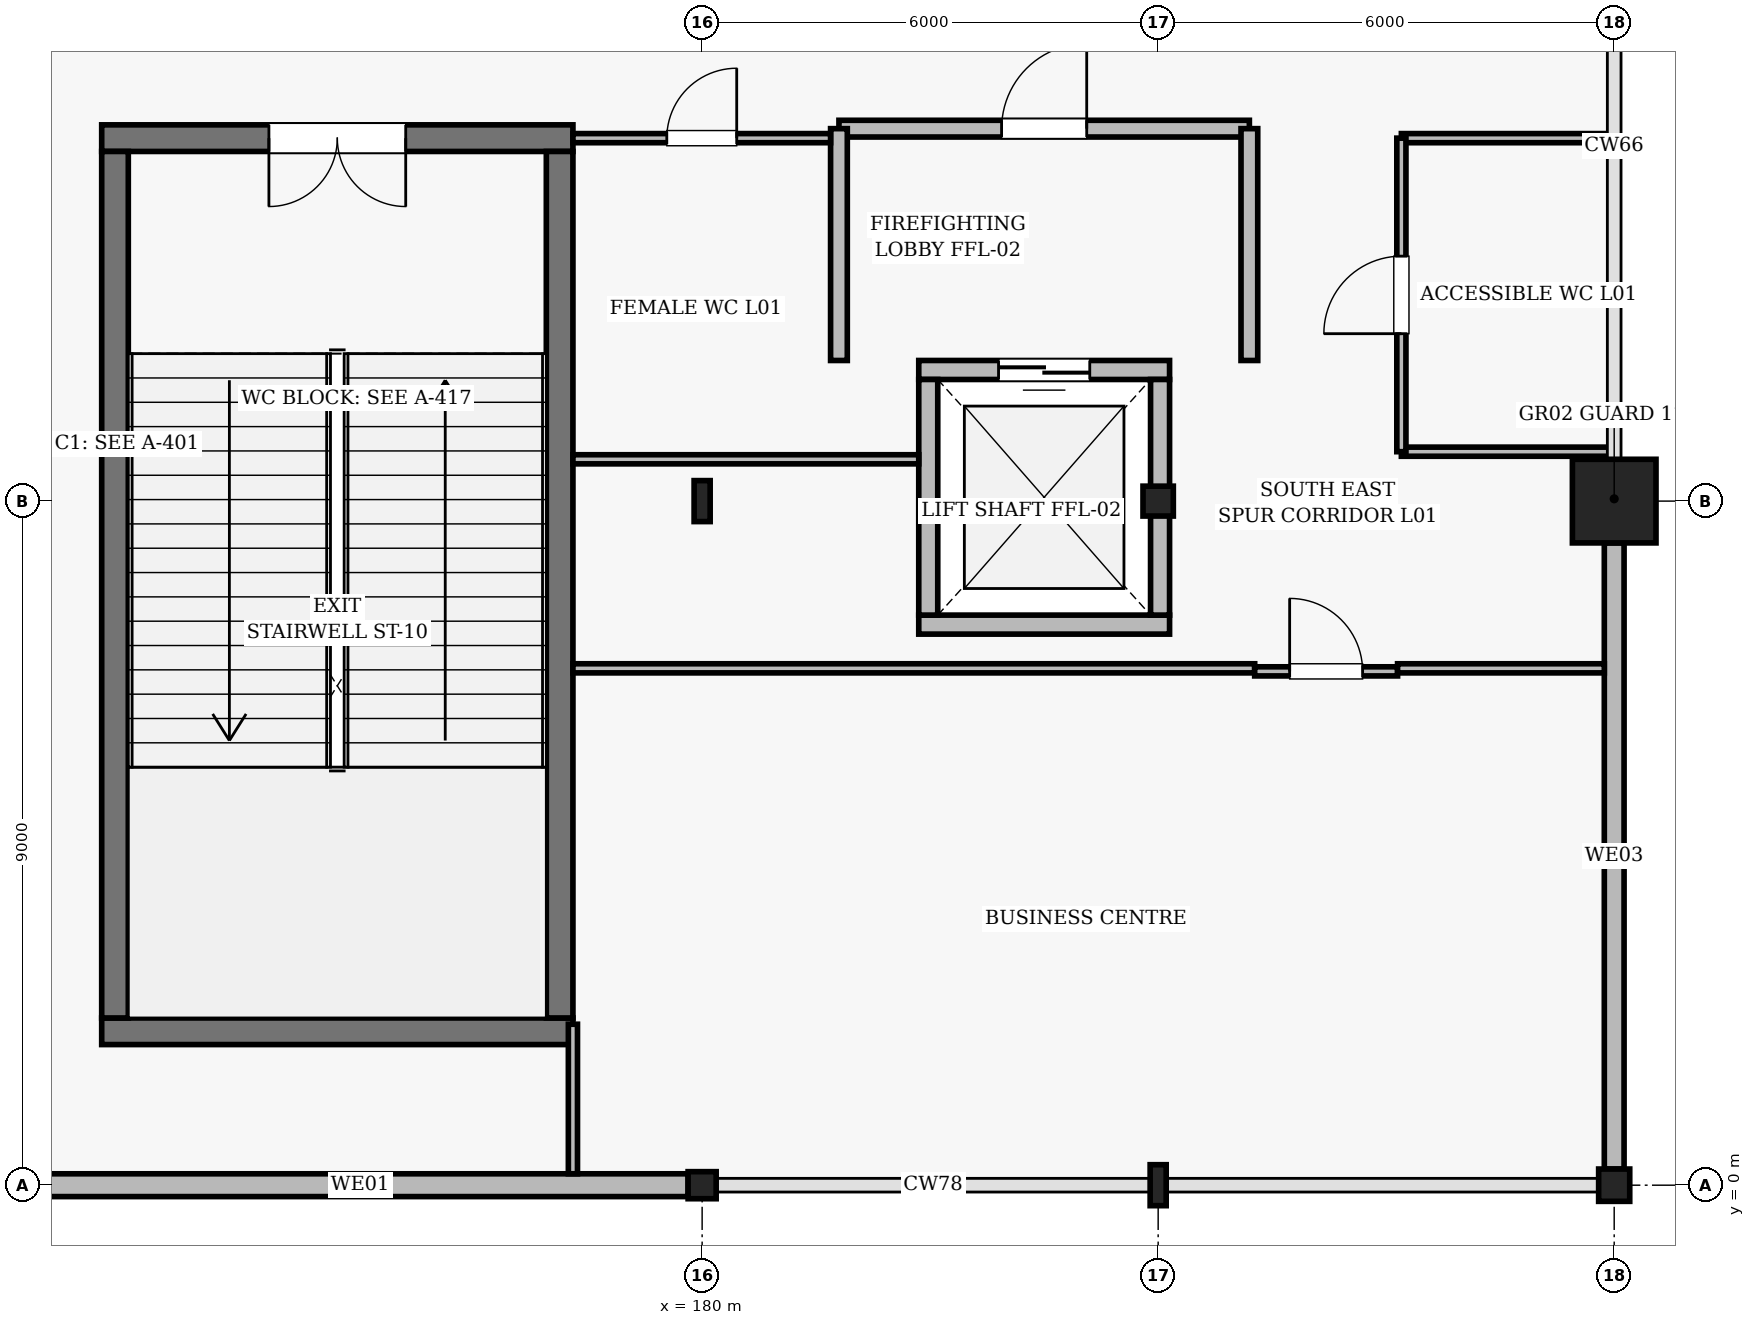
"""IFC4 building model, lengths in metres.
Left out: names, types, materials, properties, quantities, classifications, styles, units other than length and angle.
Written with IfcOpenShell. Run it as: python <this file> out.ifc"""

import sys

from ifc_helpers import new_model, si_unit, direction, frame, frame_2d, origin, origin_2d, place, context, subcontext, project, spatial, rectangle, i_section, extrude, element, fill, save


model = new_model("IFC4")
c1 = context("Model", 3, precision=1e-05, world=origin(), true_north=direction((0.0, 1.0)))
c2 = subcontext(c1, "Body", "Model", "MODEL_VIEW")
j1 = project(units=[si_unit("LENGTHUNIT", "METRE"), si_unit("PLANEANGLEUNIT", "RADIAN")], contexts=[c1])
p1 = place(None, origin())
s1 = spatial("IfcSite", under=j1, at=p1, CompositionType="ELEMENT")
p2 = place(p1, origin())
s2 = spatial("IfcBuilding", under=s1, at=p2, CompositionType="ELEMENT")
p3 = place(p2, frame((0.0, 0.0, 5.4)))
s3 = spatial("IfcBuildingStorey", under=s2, at=p3, CompositionType="ELEMENT", Elevation=5.4)
p4 = place(p3, frame((180.0, 0.0, 0.0), z_axis=(0.0, 0.0, 1.0), x_axis=(1.0, 0.0, 0.0)))
e1 = element("IfcColumn", 1, at=p4, inside=s3, PredefinedType="COLUMN", context=c2, shape_type="SweptSolid", body=[
    extrude(i_section(OverallWidth=0.369, OverallDepth=0.356, WebThickness=0.011, FlangeThickness=0.018, FilletRadius=0.015, at=origin_2d()), origin(), (0.0, 0.0, 1.0), 5.4),
])
for number, where, z_axis, x_axis in (
    (2, (180.0, 9.0, 0.0), (0.0, 0.0, 1.0), (1.0, 0.0, 0.0)),
    (3, (186.0, 0.0, 0.0), (0.0, 0.0, 1.0), (1.0, 0.0, 0.0)),
):
    element("IfcColumn", number, at=place(p3, frame(where, z_axis=z_axis, x_axis=x_axis)), inside=s3, PredefinedType="COLUMN", context=c2, shape_type="SweptSolid", body=[
        extrude(i_section(OverallWidth=0.211, OverallDepth=0.539, WebThickness=0.012, FlangeThickness=0.019, FilletRadius=0.014, at=origin_2d()), origin(), (0.0, 0.0, 1.0), 5.4),
    ])
p5 = place(p3, frame((186.0, 9.0, 0.0), z_axis=(0.0, 0.0, 1.0), x_axis=(1.0, 0.0, 0.0)))
e4 = element("IfcColumn", 4, at=p5, inside=s3, PredefinedType="COLUMN", context=c2, shape_type="SweptSolid", body=[
    extrude(i_section(OverallWidth=0.399, OverallDepth=0.393, WebThickness=0.023, FlangeThickness=0.037, FilletRadius=0.018, at=origin_2d()), origin(), (0.0, 0.0, 1.0), 5.4),
])
p6 = place(p3, frame((192.0, 0.0, 0.0), z_axis=(0.0, 0.0, 1.0), x_axis=(1.0, 0.0, 0.0)))
e5 = element("IfcColumn", 5, at=p6, inside=s3, PredefinedType="COLUMN", context=c2, shape_type="SweptSolid", body=[
    extrude(i_section(OverallWidth=0.409, OverallDepth=0.425, WebThickness=0.031, FlangeThickness=0.049, FilletRadius=0.02, at=origin_2d()), origin(), (0.0, 0.0, 1.0), 5.4),
])
p7 = place(p3, frame((192.0, 9.0, 0.0), z_axis=(0.0, 0.0, 1.0), x_axis=(1.0, 0.0, 0.0)))
e6 = element("IfcColumn", 6, at=p7, inside=s3, PredefinedType="COLUMN", context=c2, shape_type="SweptSolid", body=[
    extrude(rectangle(XDim=1.1, YDim=1.1, at=origin_2d()), origin(), (0.0, 0.0, 1.0), 5.4),
])
p8 = place(p3, frame((192.0, 8.45, 0.0), z_axis=(0.0, 0.0, 1.0), x_axis=(0.0, -1.0, 0.0)))
e7 = element("IfcWall", 7, at=p8, inside=s3, PredefinedType="SOLIDWALL", context=c2, shape_type="SweptSolid", body=[
    extrude(rectangle(XDim=8.238, YDim=0.26, at=frame_2d((4.119, 0.0))), origin(), (0.0, 0.0, 1.0), 4.865),
])
p9 = place(p3, frame((179.815, 0.0, 0.0), z_axis=(0.0, 0.0, 1.0), x_axis=(-1.0, 0.0, 0.0)))
e8 = element("IfcWall", 8, at=p9, inside=s3, PredefinedType="SOLIDWALL", context=c2, shape_type="SweptSolid", body=[
    extrude(rectangle(XDim=8.628, YDim=0.3, at=frame_2d((4.314, 0.0))), origin(), (0.0, 0.0, 1.0), 4.865),
])
p10 = place(p3, frame((172.1, 2.025, 0.0), z_axis=(0.0, 0.0, 1.0), x_axis=(1.0, 0.0, 0.0)))
e9 = element("IfcWall", 9, at=p10, inside=s3, PredefinedType="SHEAR", context=c2, shape_type="SweptSolid", body=[
    extrude(rectangle(XDim=6.2, YDim=0.35, at=frame_2d((3.1, 0.0))), origin(), (0.0, 0.0, 1.0), 5.18),
])
p11 = place(p3, frame((178.3, 13.775, 0.0), z_axis=(0.0, 0.0, 1.0), x_axis=(-1.0, 0.0, 0.0)))
e10 = element("IfcWall", 10, at=p11, inside=s3, PredefinedType="SHEAR", context=c2, shape_type="SweptSolid", body=[
    extrude(rectangle(XDim=6.2, YDim=0.35, at=frame_2d((3.1, 0.0))), origin(), (0.0, 0.0, 1.0), 5.18),
])
p12 = place(p11, frame((2.2, 0.0, 0.0)))
e11 = element("IfcOpeningElement", 11, at=p12, cuts=e10, PredefinedType="OPENING", context=c2, shape_type="SweptSolid", body=[
    extrude(rectangle(XDim=1.8, YDim=2.2, at=frame_2d((0.9, 1.1))), frame((0.0, 0.185, 0.0), z_axis=(0.0, -1.0, 0.0), x_axis=(1.0, 0.0, 0.0)), (0.0, 0.0, 1.0), 0.37),
])
for number, where, z_axis, x_axis in (
    (12, (172.275, 13.6, 0.0), (0.0, 0.0, 1.0), (0.0, -1.0, 0.0)),
    (13, (178.125, 2.2, 0.0), (0.0, 0.0, 1.0), (0.0, 1.0, 0.0)),
):
    element("IfcWall", number, at=place(p3, frame(where, z_axis=z_axis, x_axis=x_axis)), inside=s3, PredefinedType="SHEAR", context=c2, shape_type="SweptSolid", body=[
        extrude(rectangle(XDim=11.4, YDim=0.35, at=frame_2d((5.7, 0.0))), origin(), (0.0, 0.0, 1.0), 5.18),
    ])
p13 = place(p3, frame((182.85, 7.375, 0.0), z_axis=(0.0, 0.0, 1.0), x_axis=(1.0, 0.0, 0.0)))
e14 = element("IfcWall", 14, at=p13, inside=s3, PredefinedType="SOLIDWALL", context=c2, shape_type="SweptSolid", body=[
    extrude(rectangle(XDim=3.3, YDim=0.25, at=frame_2d((1.65, 0.0))), origin(), (0.0, 0.0, 1.0), 5.16),
])
p14 = place(p3, frame((186.15, 10.725, 0.0), z_axis=(0.0, 0.0, 1.0), x_axis=(-1.0, 0.0, 0.0)))
e15 = element("IfcWall", 15, at=p14, inside=s3, PredefinedType="SOLIDWALL", context=c2, shape_type="SweptSolid", body=[
    extrude(rectangle(XDim=3.3, YDim=0.25, at=frame_2d((1.65, 0.0))), origin(), (0.0, 0.0, 1.0), 5.16),
])
p15 = place(p14, frame((1.05, 0.0, 0.0)))
e16 = element("IfcOpeningElement", 16, at=p15, cuts=e15, PredefinedType="OPENING", context=c2, shape_type="SweptSolid", body=[
    extrude(rectangle(XDim=1.2, YDim=2.25, at=frame_2d((0.6, 1.125))), frame((0.0, 0.135, 0.0), z_axis=(0.0, -1.0, 0.0), x_axis=(1.0, 0.0, 0.0)), (0.0, 0.0, 1.0), 0.27),
])
for number, where, z_axis, x_axis in (
    (17, (182.975, 10.6, 0.0), (0.0, 0.0, 1.0), (0.0, -1.0, 0.0)),
    (18, (186.025, 7.5, 0.0), (0.0, 0.0, 1.0), (0.0, 1.0, 0.0)),
):
    element("IfcWall", number, at=place(p3, frame(where, z_axis=z_axis, x_axis=x_axis)), inside=s3, PredefinedType="SOLIDWALL", context=c2, shape_type="SweptSolid", body=[
        extrude(rectangle(XDim=3.1, YDim=0.25, at=frame_2d((1.55, 0.0))), origin(), (0.0, 0.0, 1.0), 5.16),
    ])
p16 = place(p3, frame((181.8, 13.9, 0.0), z_axis=(0.0, 0.0, 1.0), x_axis=(1.0, 0.0, 0.0)))
e19 = element("IfcWall", 19, at=p16, inside=s3, PredefinedType="SOLIDWALL", context=c2, shape_type="SweptSolid", body=[
    extrude(rectangle(XDim=5.4, YDim=0.22, at=frame_2d((2.7, 0.0))), origin(), (0.0, 0.0, 1.0), 5.16),
])
p17 = place(p16, frame((2.14, 0.0, 0.0)))
e20 = element("IfcOpeningElement", 20, at=p17, cuts=e19, PredefinedType="OPENING", context=c2, shape_type="SweptSolid", body=[
    extrude(rectangle(XDim=1.12, YDim=2.2, at=frame_2d((0.56, 1.1))), frame((0.0, 0.12, 0.0), z_axis=(0.0, -1.0, 0.0), x_axis=(1.0, 0.0, 0.0)), (0.0, 0.0, 1.0), 0.24),
])
for number, where, z_axis, x_axis in (
    (21, (181.8, 10.85, 0.0), (0.0, 0.0, 1.0), (0.0, 1.0, 0.0)),
    (22, (187.2, 10.85, 0.0), (0.0, 0.0, 1.0), (0.0, 1.0, 0.0)),
):
    element("IfcWall", number, at=place(p3, frame(where, z_axis=z_axis, x_axis=x_axis)), inside=s3, PredefinedType="SOLIDWALL", context=c2, shape_type="SweptSolid", body=[
        extrude(rectangle(XDim=3.05, YDim=0.22, at=frame_2d((1.525, 0.0))), origin(), (0.0, 0.0, 1.0), 5.16),
    ])
p18 = place(p3, frame((178.3, 13.775, 0.0), z_axis=(0.0, 0.0, 1.0), x_axis=(1.0, 0.0, 0.0)))
e23 = element("IfcWall", 23, at=p18, inside=s3, PredefinedType="PARTITIONING", context=c2, shape_type="SweptSolid", body=[
    extrude(rectangle(XDim=3.39, YDim=0.12, at=frame_2d((1.695, 0.0))), origin(), (0.0, 0.0, 1.0), 4.392),
])
p19 = place(p18, frame((1.235, 0.0, 0.0)))
e24 = element("IfcOpeningElement", 24, at=p19, cuts=e23, PredefinedType="OPENING", context=c2, shape_type="SweptSolid", body=[
    extrude(rectangle(XDim=0.92, YDim=2.12, at=frame_2d((0.46, 1.06))), frame((0.0, 0.07, 0.0), z_axis=(0.0, -1.0, 0.0), x_axis=(1.0, 0.0, 0.0)), (0.0, 0.0, 1.0), 0.14),
])
p20 = place(p3, frame((182.85, 9.55, 0.0), z_axis=(0.0, 0.0, 1.0), x_axis=(-1.0, 0.0, 0.0)))
e25 = element("IfcWall", 25, at=p20, inside=s3, PredefinedType="PARTITIONING", context=c2, shape_type="SweptSolid", body=[
    extrude(rectangle(XDim=4.55, YDim=0.12, at=frame_2d((2.275, 0.0))), origin(), (0.0, 0.0, 1.0), 4.392),
])
for number, where, z_axis, x_axis in (
    (26, (189.2, 13.775, 0.0), (0.0, 0.0, 1.0), (1.0, 0.0, 0.0)),
    (27, (191.988, 9.65, 0.0), (0.0, 0.0, 1.0), (-1.0, 0.0, 0.0)),
):
    element("IfcWall", number, at=place(p3, frame(where, z_axis=z_axis, x_axis=x_axis)), inside=s3, PredefinedType="PARTITIONING", context=c2, shape_type="SweptSolid", body=[
        extrude(rectangle(XDim=2.788, YDim=0.12, at=frame_2d((1.394, 0.0))), origin(), (0.0, 0.0, 1.0), 4.626),
    ])
p21 = place(p3, frame((189.2, 9.65, 0.0), z_axis=(0.0, 0.0, 1.0), x_axis=(0.0, 1.0, 0.0)))
e28 = element("IfcWall", 28, at=p21, inside=s3, PredefinedType="PARTITIONING", context=c2, shape_type="SweptSolid", body=[
    extrude(rectangle(XDim=4.125, YDim=0.12, at=frame_2d((2.062, 0.0))), origin(), (0.0, 0.0, 1.0), 5.16),
])
p22 = place(p21, frame((1.552, 0.0, 0.0)))
e29 = element("IfcOpeningElement", 29, at=p22, cuts=e28, PredefinedType="OPENING", context=c2, shape_type="SweptSolid", body=[
    extrude(rectangle(XDim=1.02, YDim=2.16, at=frame_2d((0.51, 1.08))), frame((0.0, 0.07, 0.0), z_axis=(0.0, -1.0, 0.0), x_axis=(1.0, 0.0, 0.0)), (0.0, 0.0, 1.0), 0.14),
])
p23 = place(p3, frame((178.3, 6.8, 0.0), z_axis=(0.0, 0.0, 1.0), x_axis=(1.0, 0.0, 0.0)))
e30 = element("IfcWall", 30, at=p23, inside=s3, PredefinedType="PARTITIONING", context=c2, shape_type="SweptSolid", body=[
    extrude(rectangle(XDim=8.97, YDim=0.12, at=frame_2d((4.485, 0.0))), origin(), (0.0, 0.0, 1.0), 4.392),
])
p24 = place(p3, frame((187.27, 6.76, 0.0), z_axis=(0.0, 0.0, 1.0), x_axis=(1.0, 0.0, 0.0)))
e31 = element("IfcWall", 31, at=p24, inside=s3, PredefinedType="PARTITIONING", context=c2, shape_type="SweptSolid", body=[
    extrude(rectangle(XDim=1.88, YDim=0.12, at=frame_2d((0.94, 0.0))), origin(), (0.0, 0.0, 1.0), 5.16),
])
p25 = place(p24, frame((0.46, 0.0, 0.0)))
e32 = element("IfcOpeningElement", 32, at=p25, cuts=e31, PredefinedType="OPENING", context=c2, shape_type="SweptSolid", body=[
    extrude(rectangle(XDim=0.96, YDim=2.15, at=frame_2d((0.48, 1.075))), frame((0.0, 0.07, 0.0), z_axis=(0.0, -1.0, 0.0), x_axis=(1.0, 0.0, 0.0)), (0.0, 0.0, 1.0), 0.14),
])
p26 = place(p3, frame((189.15, 6.8, 0.0), z_axis=(0.0, 0.0, 1.0), x_axis=(1.0, 0.0, 0.0)))
e33 = element("IfcWall", 33, at=p26, inside=s3, PredefinedType="PARTITIONING", context=c2, shape_type="SweptSolid", body=[
    extrude(rectangle(XDim=2.72, YDim=0.12, at=frame_2d((1.36, 0.0))), origin(), (0.0, 0.0, 1.0), 4.865),
])
p27 = place(p3, frame((178.3, 0.15, 0.0), z_axis=(0.0, 0.0, 1.0), x_axis=(0.0, 1.0, 0.0)))
e34 = element("IfcWall", 34, at=p27, inside=s3, PredefinedType="PARTITIONING", context=c2, shape_type="SweptSolid", body=[
    extrude(rectangle(XDim=1.968, YDim=0.12, at=frame_2d((0.984, 0.0))), origin(), (0.0, 0.0, 1.0), 4.865),
])
p28 = place(p12, origin())
e35 = element("IfcDoor", 35, at=p28, inside=s3, OperationType="DOUBLE_DOOR_SINGLE_SWING", PredefinedType="DOOR", context=c2, shape_type="SweptSolid", body=[
    extrude(rectangle(XDim=1.8, YDim=2.2, at=frame_2d((0.9, 1.1))), frame((0.0, 0.025, 0.0), z_axis=(0.0, -1.0, 0.0), x_axis=(1.0, 0.0, 0.0)), (0.0, 0.0, 1.0), 0.05),
])
fill(e11, e35)
p29 = place(p15, origin())
e36 = element("IfcDoor", 36, at=p29, inside=s3, OperationType="DOUBLE_DOOR_SLIDING", PredefinedType="DOOR", context=c2, shape_type="SweptSolid", body=[
    extrude(rectangle(XDim=1.2, YDim=2.25, at=frame_2d((0.6, 1.125))), frame((0.0, 0.025, 0.0), z_axis=(0.0, -1.0, 0.0), x_axis=(1.0, 0.0, 0.0)), (0.0, 0.0, 1.0), 0.05),
])
fill(e16, e36)
p30 = place(p17, origin())
e37 = element("IfcDoor", 37, at=p30, inside=s3, OperationType="SINGLE_SWING_RIGHT", PredefinedType="DOOR", context=c2, shape_type="SweptSolid", body=[
    extrude(rectangle(XDim=1.12, YDim=2.2, at=frame_2d((0.56, 1.1))), frame((0.0, 0.025, 0.0), z_axis=(0.0, -1.0, 0.0), x_axis=(1.0, 0.0, 0.0)), (0.0, 0.0, 1.0), 0.05),
])
fill(e20, e37)
p31 = place(p19, origin())
e38 = element("IfcDoor", 38, at=p31, inside=s3, OperationType="SINGLE_SWING_RIGHT", PredefinedType="DOOR", context=c2, shape_type="SweptSolid", body=[
    extrude(rectangle(XDim=0.92, YDim=2.12, at=frame_2d((0.46, 1.06))), frame((0.0, 0.025, 0.0), z_axis=(0.0, -1.0, 0.0), x_axis=(1.0, 0.0, 0.0)), (0.0, 0.0, 1.0), 0.05),
])
fill(e24, e38)
p32 = place(p22, origin())
e39 = element("IfcDoor", 39, at=p32, inside=s3, OperationType="SINGLE_SWING_LEFT", PredefinedType="DOOR", context=c2, shape_type="SweptSolid", body=[
    extrude(rectangle(XDim=1.02, YDim=2.16, at=frame_2d((0.51, 1.08))), frame((0.0, 0.025, 0.0), z_axis=(0.0, -1.0, 0.0), x_axis=(1.0, 0.0, 0.0)), (0.0, 0.0, 1.0), 0.05),
])
fill(e29, e39)
p33 = place(p25, origin())
e40 = element("IfcDoor", 40, at=p33, inside=s3, OperationType="SINGLE_SWING_LEFT", PredefinedType="DOOR", context=c2, shape_type="SweptSolid", body=[
    extrude(rectangle(XDim=0.96, YDim=2.15, at=frame_2d((0.48, 1.075))), frame((0.0, 0.025, 0.0), z_axis=(0.0, -1.0, 0.0), x_axis=(1.0, 0.0, 0.0)), (0.0, 0.0, 1.0), 0.05),
])
fill(e32, e40)
save(model, sys.argv[1])
